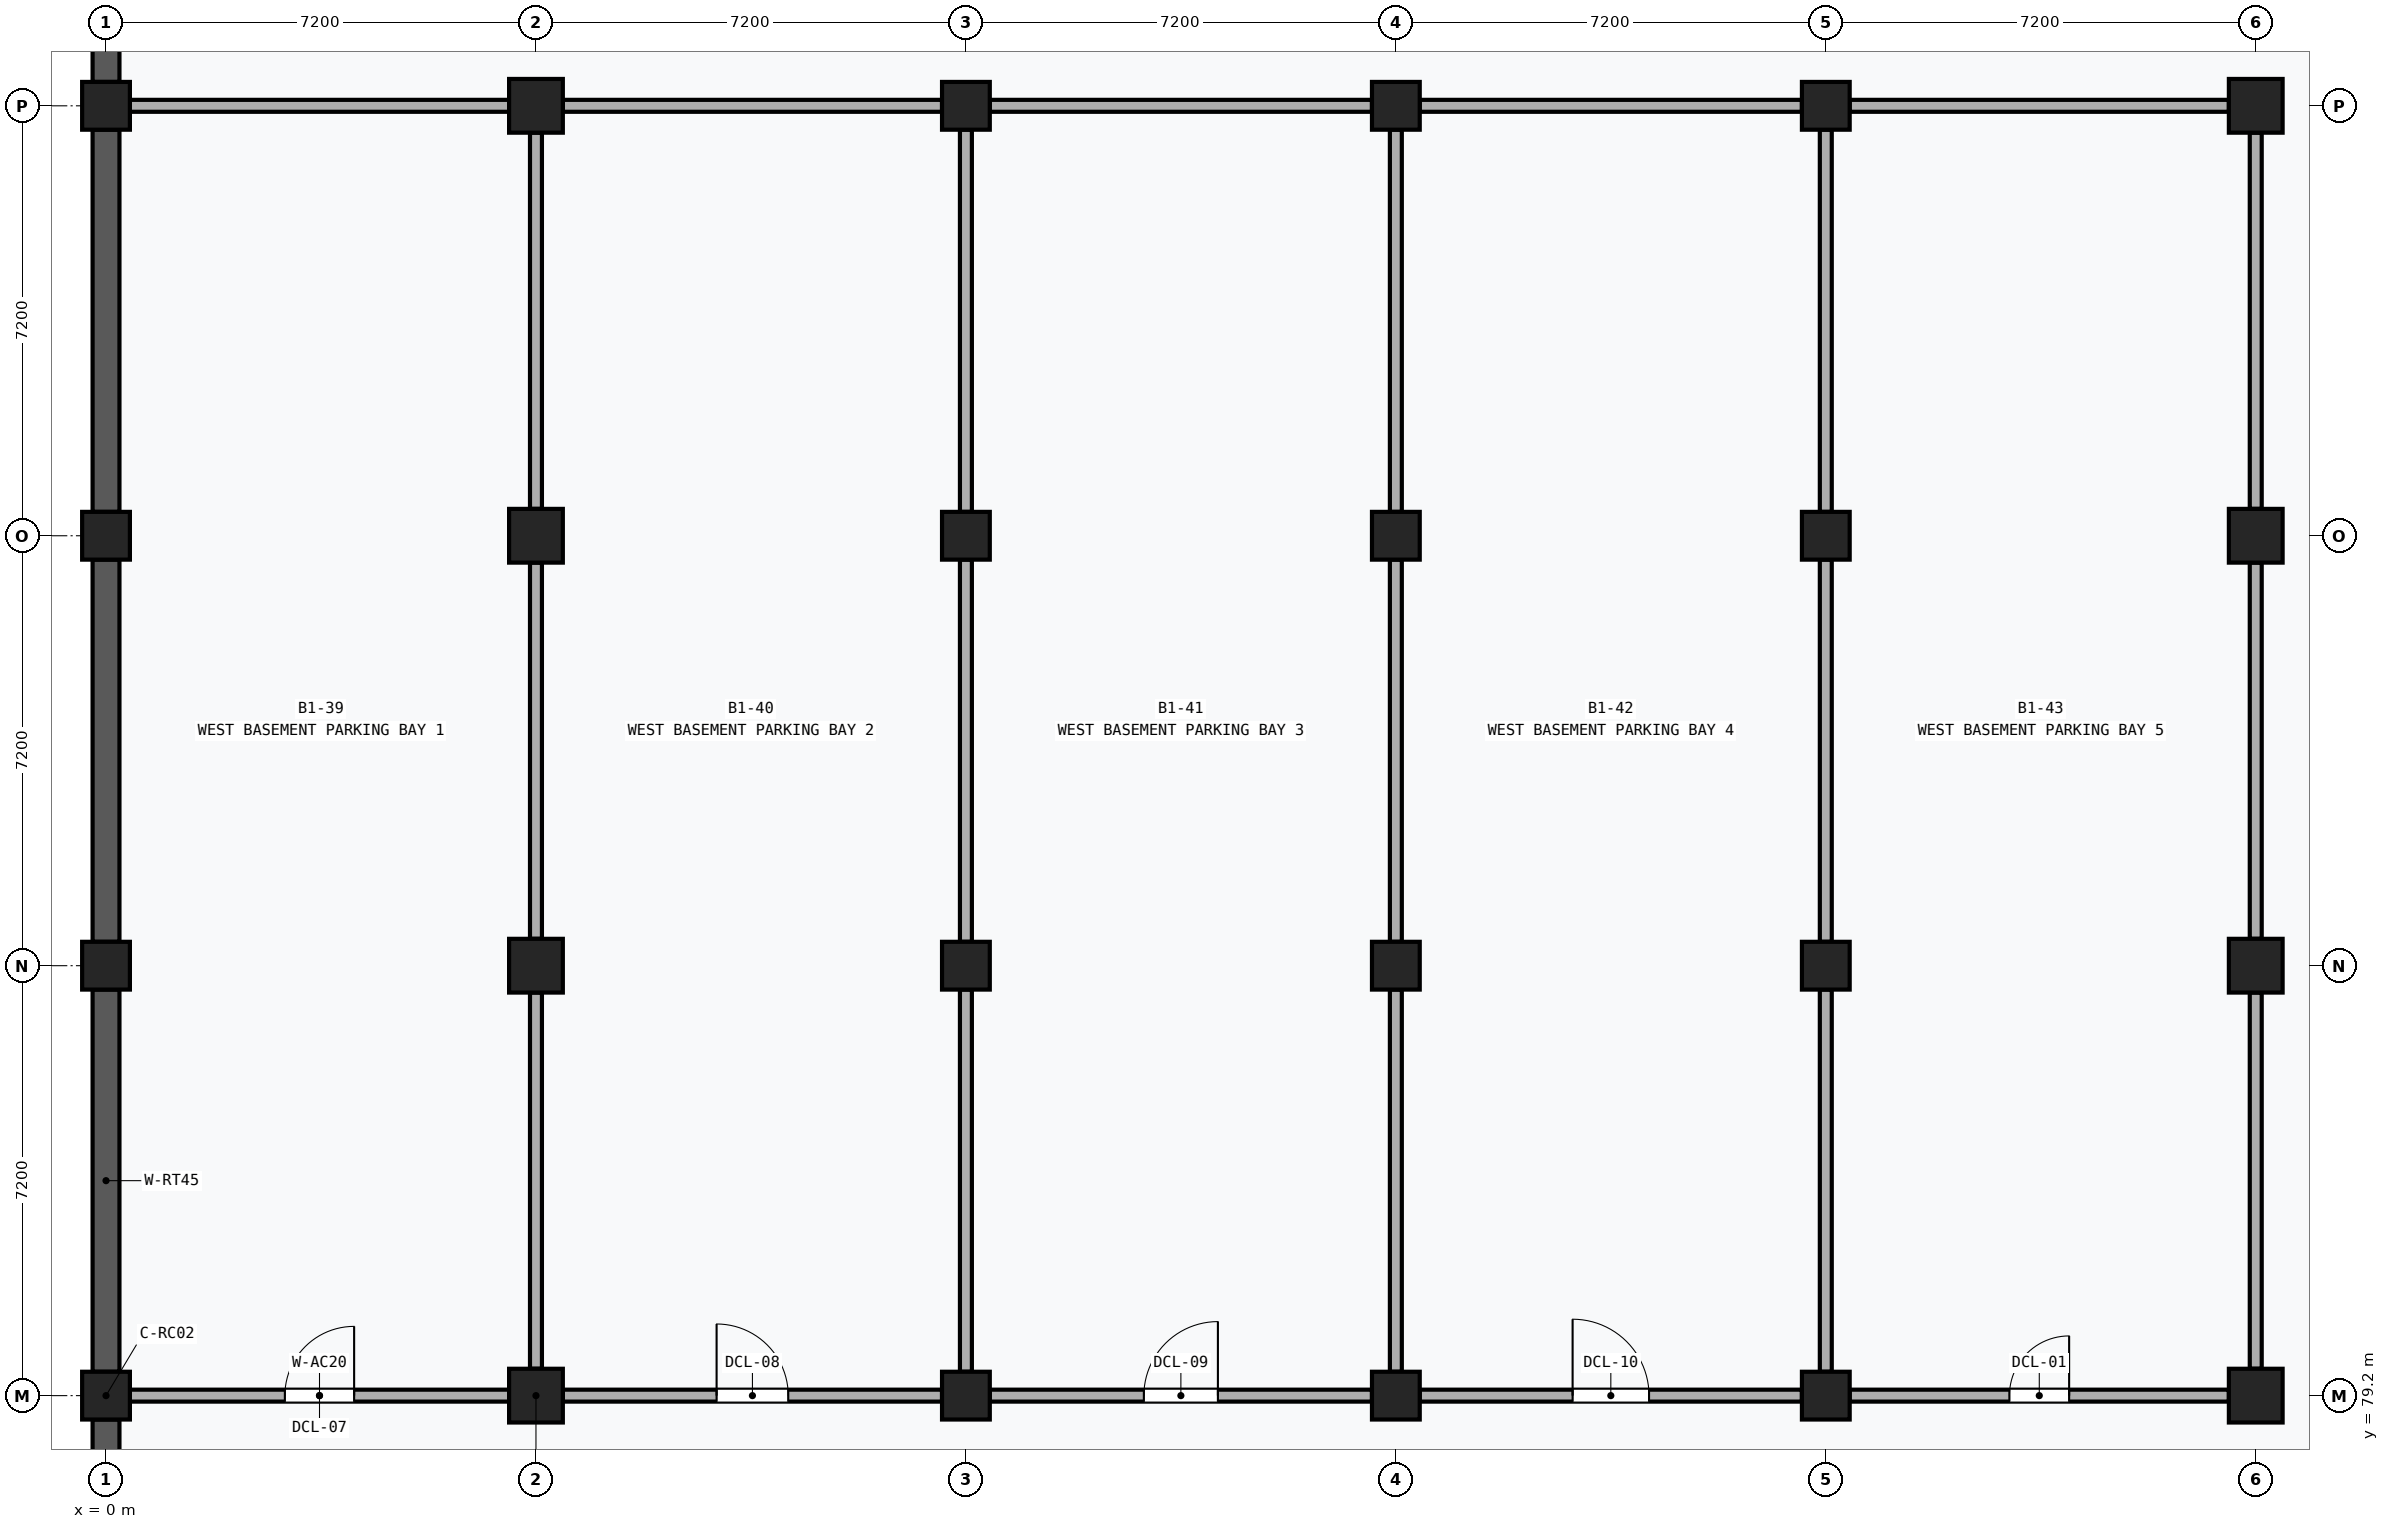
"""IFC4 building model, lengths in metres.
Left out: names, types, materials, properties, quantities, classifications, styles, units other than length and angle.
Written with IfcOpenShell. Run it as: python <this file> out.ifc"""

import sys

from ifc_helpers import new_model, si_unit, direction, frame, frame_2d, origin, origin_2d, place, context, subcontext, project, spatial, rectangle, extrude, element, fill, save


model = new_model("IFC4")
c1 = context("Model", 3, precision=1e-05, world=origin(), true_north=direction((0.0, 1.0)))
c2 = subcontext(c1, "Body", "Model", "MODEL_VIEW")
j1 = project(units=[si_unit("LENGTHUNIT", "METRE"), si_unit("PLANEANGLEUNIT", "RADIAN")], contexts=[c1])
p1 = place(None, origin())
s1 = spatial("IfcSite", under=j1, at=p1, CompositionType="ELEMENT")
p2 = place(p1, origin())
s2 = spatial("IfcBuilding", under=s1, at=p2, CompositionType="ELEMENT")
p3 = place(p2, frame((0.0, 0.0, -4.5)))
s3 = spatial("IfcBuildingStorey", under=s2, at=p3, CompositionType="ELEMENT", Elevation=-4.5)
for number, where, z_axis, x_axis in (
    (1, (0.0, 79.2, 0.0), (0.0, 0.0, 1.0), (1.0, 0.0, 0.0)),
    (2, (0.0, 86.4, 0.0), (0.0, 0.0, 1.0), (1.0, 0.0, 0.0)),
    (3, (0.0, 93.6, 0.0), (0.0, 0.0, 1.0), (1.0, 0.0, 0.0)),
    (4, (0.0, 100.8, 0.0), (0.0, 0.0, 1.0), (1.0, 0.0, 0.0)),
):
    element("IfcColumn", number, at=place(p3, frame(where, z_axis=z_axis, x_axis=x_axis)), inside=s3, PredefinedType="COLUMN", context=c2, shape_type="SweptSolid", body=[
        extrude(rectangle(XDim=0.8, YDim=0.8, at=origin_2d()), origin(), (0.0, 0.0, 1.0), 4.5),
    ])
for number, where, z_axis, x_axis in (
    (5, (7.2, 79.2, 0.0), (0.0, 0.0, 1.0), (1.0, 0.0, 0.0)),
    (6, (7.2, 86.4, 0.0), (0.0, 0.0, 1.0), (1.0, 0.0, 0.0)),
    (7, (7.2, 93.6, 0.0), (0.0, 0.0, 1.0), (1.0, 0.0, 0.0)),
    (8, (7.2, 100.8, 0.0), (0.0, 0.0, 1.0), (1.0, 0.0, 0.0)),
):
    element("IfcColumn", number, at=place(p3, frame(where, z_axis=z_axis, x_axis=x_axis)), inside=s3, PredefinedType="COLUMN", context=c2, shape_type="SweptSolid", body=[
        extrude(rectangle(XDim=0.9, YDim=0.9, at=origin_2d()), origin(), (0.0, 0.0, 1.0), 4.5),
    ])
for number, where, z_axis, x_axis in (
    (9, (14.4, 79.2, 0.0), (0.0, 0.0, 1.0), (1.0, 0.0, 0.0)),
    (10, (14.4, 86.4, 0.0), (0.0, 0.0, 1.0), (1.0, 0.0, 0.0)),
    (11, (14.4, 93.6, 0.0), (0.0, 0.0, 1.0), (1.0, 0.0, 0.0)),
    (12, (14.4, 100.8, 0.0), (0.0, 0.0, 1.0), (1.0, 0.0, 0.0)),
    (13, (21.6, 79.2, 0.0), (0.0, 0.0, 1.0), (1.0, 0.0, 0.0)),
    (14, (21.6, 86.4, 0.0), (0.0, 0.0, 1.0), (1.0, 0.0, 0.0)),
    (15, (21.6, 93.6, 0.0), (0.0, 0.0, 1.0), (1.0, 0.0, 0.0)),
    (16, (21.6, 100.8, 0.0), (0.0, 0.0, 1.0), (1.0, 0.0, 0.0)),
    (17, (28.8, 79.2, 0.0), (0.0, 0.0, 1.0), (1.0, 0.0, 0.0)),
    (18, (28.8, 86.4, 0.0), (0.0, 0.0, 1.0), (1.0, 0.0, 0.0)),
    (19, (28.8, 93.6, 0.0), (0.0, 0.0, 1.0), (1.0, 0.0, 0.0)),
    (20, (28.8, 100.8, 0.0), (0.0, 0.0, 1.0), (1.0, 0.0, 0.0)),
):
    element("IfcColumn", number, at=place(p3, frame(where, z_axis=z_axis, x_axis=x_axis)), inside=s3, PredefinedType="COLUMN", context=c2, shape_type="SweptSolid", body=[
        extrude(rectangle(XDim=0.8, YDim=0.8, at=origin_2d()), origin(), (0.0, 0.0, 1.0), 4.5),
    ])
for number, where, z_axis, x_axis in (
    (21, (36.0, 79.2, 0.0), (0.0, 0.0, 1.0), (1.0, 0.0, 0.0)),
    (22, (36.0, 86.4, 0.0), (0.0, 0.0, 1.0), (1.0, 0.0, 0.0)),
    (23, (36.0, 93.6, 0.0), (0.0, 0.0, 1.0), (1.0, 0.0, 0.0)),
    (24, (36.0, 100.8, 0.0), (0.0, 0.0, 1.0), (1.0, 0.0, 0.0)),
):
    element("IfcColumn", number, at=place(p3, frame(where, z_axis=z_axis, x_axis=x_axis)), inside=s3, PredefinedType="COLUMN", context=c2, shape_type="SweptSolid", body=[
        extrude(rectangle(XDim=0.9, YDim=0.9, at=origin_2d()), origin(), (0.0, 0.0, 1.0), 4.5),
    ])
p4 = place(p3, frame((0.0, 72.4, 0.0), z_axis=(0.0, 0.0, 1.0), x_axis=(0.0, 1.0, 0.0)))
e25 = element("IfcWall", 25, at=p4, inside=s3, PredefinedType="SOLIDWALL", context=c2, shape_type="SweptSolid", body=[
    extrude(rectangle(XDim=6.4, YDim=0.45, at=frame_2d((3.2, 0.0))), origin(), (0.0, 0.0, 1.0), 3.57),
])
for number, where, z_axis, x_axis in (
    (26, (0.0, 79.6, 0.0), (0.0, 0.0, 1.0), (0.0, 1.0, 0.0)),
    (27, (0.0, 86.8, 0.0), (0.0, 0.0, 1.0), (0.0, 1.0, 0.0)),
    (28, (0.0, 94.0, 0.0), (0.0, 0.0, 1.0), (0.0, 1.0, 0.0)),
):
    element("IfcWall", number, at=place(p3, frame(where, z_axis=z_axis, x_axis=x_axis)), inside=s3, PredefinedType="SOLIDWALL", context=c2, shape_type="SweptSolid", body=[
        extrude(rectangle(XDim=6.4, YDim=0.45, at=frame_2d((3.2, 0.0))), origin(), (0.0, 0.0, 1.0), 3.57),
    ])
p5 = place(p3, frame((0.0, 101.2, 0.0), z_axis=(0.0, 0.0, 1.0), x_axis=(0.0, 1.0, 0.0)))
e29 = element("IfcWall", 29, at=p5, inside=s3, PredefinedType="SOLIDWALL", context=c2, shape_type="SweptSolid", body=[
    extrude(rectangle(XDim=6.4, YDim=0.45, at=frame_2d((3.2, 0.0))), origin(), (0.0, 0.0, 1.0), 3.57),
])
p6 = place(p3, frame((0.4, 79.2, 0.0), z_axis=(0.0, 0.0, 1.0), x_axis=(1.0, 0.0, 0.0)))
e30 = element("IfcWall", 30, at=p6, inside=s3, PredefinedType="PARTITIONING", context=c2, shape_type="SweptSolid", body=[
    extrude(rectangle(XDim=6.35, YDim=0.2, at=frame_2d((3.175, 0.0))), origin(), (0.0, 0.0, 1.0), 3.3),
])
p7 = place(p6, frame((2.595, 0.0, 0.0)))
e31 = element("IfcOpeningElement", 31, at=p7, cuts=e30, PredefinedType="OPENING", context=c2, shape_type="SweptSolid", body=[
    extrude(rectangle(XDim=1.16, YDim=2.22, at=frame_2d((0.58, 1.11))), frame((0.0, 0.112, 0.0), z_axis=(0.0, -1.0, 0.0), x_axis=(1.0, 0.0, 0.0)), (0.0, 0.0, 1.0), 0.224),
])
p8 = place(p3, frame((7.2, 79.65, 0.0), z_axis=(0.0, 0.0, 1.0), x_axis=(0.0, 1.0, 0.0)))
e32 = element("IfcWall", 32, at=p8, inside=s3, PredefinedType="PARTITIONING", context=c2, shape_type="SweptSolid", body=[
    extrude(rectangle(XDim=6.3, YDim=0.2, at=frame_2d((3.15, 0.0))), origin(), (0.0, 0.0, 1.0), 3.3),
])
p9 = place(p3, frame((7.2, 86.85, 0.0), z_axis=(0.0, 0.0, 1.0), x_axis=(0.0, 1.0, 0.0)))
e33 = element("IfcWall", 33, at=p9, inside=s3, PredefinedType="PARTITIONING", context=c2, shape_type="SweptSolid", body=[
    extrude(rectangle(XDim=6.3, YDim=0.2, at=frame_2d((3.15, 0.0))), origin(), (0.0, 0.0, 1.0), 3.3),
])
p10 = place(p3, frame((0.4, 100.8, 0.0), z_axis=(0.0, 0.0, 1.0), x_axis=(1.0, 0.0, 0.0)))
e34 = element("IfcWall", 34, at=p10, inside=s3, PredefinedType="PARTITIONING", context=c2, shape_type="SweptSolid", body=[
    extrude(rectangle(XDim=6.35, YDim=0.2, at=frame_2d((3.175, 0.0))), origin(), (0.0, 0.0, 1.0), 3.3),
])
p11 = place(p3, frame((7.2, 94.05, 0.0), z_axis=(0.0, 0.0, 1.0), x_axis=(0.0, 1.0, 0.0)))
e35 = element("IfcWall", 35, at=p11, inside=s3, PredefinedType="PARTITIONING", context=c2, shape_type="SweptSolid", body=[
    extrude(rectangle(XDim=6.3, YDim=0.2, at=frame_2d((3.15, 0.0))), origin(), (0.0, 0.0, 1.0), 3.3),
])
p12 = place(p3, frame((7.65, 79.2, 0.0), z_axis=(0.0, 0.0, 1.0), x_axis=(1.0, 0.0, 0.0)))
e36 = element("IfcWall", 36, at=p12, inside=s3, PredefinedType="PARTITIONING", context=c2, shape_type="SweptSolid", body=[
    extrude(rectangle(XDim=6.35, YDim=0.2, at=frame_2d((3.175, 0.0))), origin(), (0.0, 0.0, 1.0), 3.3),
])
p13 = place(p12, frame((2.575, 0.0, 0.0)))
e37 = element("IfcOpeningElement", 37, at=p13, cuts=e36, PredefinedType="OPENING", context=c2, shape_type="SweptSolid", body=[
    extrude(rectangle(XDim=1.2, YDim=2.24, at=frame_2d((0.6, 1.12))), frame((0.0, 0.112, 0.0), z_axis=(0.0, -1.0, 0.0), x_axis=(1.0, 0.0, 0.0)), (0.0, 0.0, 1.0), 0.224),
])
for number, where, z_axis, x_axis in (
    (38, (14.4, 79.6, 0.0), (0.0, 0.0, 1.0), (0.0, 1.0, 0.0)),
    (39, (14.4, 86.8, 0.0), (0.0, 0.0, 1.0), (0.0, 1.0, 0.0)),
):
    element("IfcWall", number, at=place(p3, frame(where, z_axis=z_axis, x_axis=x_axis)), inside=s3, PredefinedType="PARTITIONING", context=c2, shape_type="SweptSolid", body=[
        extrude(rectangle(XDim=6.4, YDim=0.2, at=frame_2d((3.2, 0.0))), origin(), (0.0, 0.0, 1.0), 3.3),
    ])
p14 = place(p3, frame((7.65, 100.8, 0.0), z_axis=(0.0, 0.0, 1.0), x_axis=(1.0, 0.0, 0.0)))
e40 = element("IfcWall", 40, at=p14, inside=s3, PredefinedType="PARTITIONING", context=c2, shape_type="SweptSolid", body=[
    extrude(rectangle(XDim=6.35, YDim=0.2, at=frame_2d((3.175, 0.0))), origin(), (0.0, 0.0, 1.0), 3.3),
])
p15 = place(p3, frame((14.4, 94.0, 0.0), z_axis=(0.0, 0.0, 1.0), x_axis=(0.0, 1.0, 0.0)))
e41 = element("IfcWall", 41, at=p15, inside=s3, PredefinedType="PARTITIONING", context=c2, shape_type="SweptSolid", body=[
    extrude(rectangle(XDim=6.4, YDim=0.2, at=frame_2d((3.2, 0.0))), origin(), (0.0, 0.0, 1.0), 3.3),
])
p16 = place(p3, frame((14.8, 79.2, 0.0), z_axis=(0.0, 0.0, 1.0), x_axis=(1.0, 0.0, 0.0)))
e42 = element("IfcWall", 42, at=p16, inside=s3, PredefinedType="PARTITIONING", context=c2, shape_type="SweptSolid", body=[
    extrude(rectangle(XDim=6.4, YDim=0.2, at=frame_2d((3.2, 0.0))), origin(), (0.0, 0.0, 1.0), 3.3),
])
p17 = place(p16, frame((2.58, 0.0, 0.0)))
e43 = element("IfcOpeningElement", 43, at=p17, cuts=e42, PredefinedType="OPENING", context=c2, shape_type="SweptSolid", body=[
    extrude(rectangle(XDim=1.24, YDim=2.26, at=frame_2d((0.62, 1.13))), frame((0.0, 0.112, 0.0), z_axis=(0.0, -1.0, 0.0), x_axis=(1.0, 0.0, 0.0)), (0.0, 0.0, 1.0), 0.224),
])
for number, where, z_axis, x_axis in (
    (44, (21.6, 79.6, 0.0), (0.0, 0.0, 1.0), (0.0, 1.0, 0.0)),
    (45, (21.6, 86.8, 0.0), (0.0, 0.0, 1.0), (0.0, 1.0, 0.0)),
    (46, (14.8, 100.8, 0.0), (0.0, 0.0, 1.0), (1.0, 0.0, 0.0)),
    (47, (21.6, 94.0, 0.0), (0.0, 0.0, 1.0), (0.0, 1.0, 0.0)),
):
    element("IfcWall", number, at=place(p3, frame(where, z_axis=z_axis, x_axis=x_axis)), inside=s3, PredefinedType="PARTITIONING", context=c2, shape_type="SweptSolid", body=[
        extrude(rectangle(XDim=6.4, YDim=0.2, at=frame_2d((3.2, 0.0))), origin(), (0.0, 0.0, 1.0), 3.3),
    ])
p18 = place(p3, frame((22.0, 79.2, 0.0), z_axis=(0.0, 0.0, 1.0), x_axis=(1.0, 0.0, 0.0)))
e48 = element("IfcWall", 48, at=p18, inside=s3, PredefinedType="PARTITIONING", context=c2, shape_type="SweptSolid", body=[
    extrude(rectangle(XDim=6.4, YDim=0.2, at=frame_2d((3.2, 0.0))), origin(), (0.0, 0.0, 1.0), 3.3),
])
p19 = place(p18, frame((2.56, 0.0, 0.0)))
e49 = element("IfcOpeningElement", 49, at=p19, cuts=e48, PredefinedType="OPENING", context=c2, shape_type="SweptSolid", body=[
    extrude(rectangle(XDim=1.28, YDim=2.28, at=frame_2d((0.64, 1.14))), frame((0.0, 0.112, 0.0), z_axis=(0.0, -1.0, 0.0), x_axis=(1.0, 0.0, 0.0)), (0.0, 0.0, 1.0), 0.224),
])
for number, where, z_axis, x_axis in (
    (50, (28.8, 79.6, 0.0), (0.0, 0.0, 1.0), (0.0, 1.0, 0.0)),
    (51, (28.8, 86.8, 0.0), (0.0, 0.0, 1.0), (0.0, 1.0, 0.0)),
    (52, (22.0, 100.8, 0.0), (0.0, 0.0, 1.0), (1.0, 0.0, 0.0)),
    (53, (28.8, 94.0, 0.0), (0.0, 0.0, 1.0), (0.0, 1.0, 0.0)),
):
    element("IfcWall", number, at=place(p3, frame(where, z_axis=z_axis, x_axis=x_axis)), inside=s3, PredefinedType="PARTITIONING", context=c2, shape_type="SweptSolid", body=[
        extrude(rectangle(XDim=6.4, YDim=0.2, at=frame_2d((3.2, 0.0))), origin(), (0.0, 0.0, 1.0), 3.3),
    ])
p20 = place(p3, frame((29.2, 79.2, 0.0), z_axis=(0.0, 0.0, 1.0), x_axis=(1.0, 0.0, 0.0)))
e54 = element("IfcWall", 54, at=p20, inside=s3, PredefinedType="PARTITIONING", context=c2, shape_type="SweptSolid", body=[
    extrude(rectangle(XDim=6.35, YDim=0.2, at=frame_2d((3.175, 0.0))), origin(), (0.0, 0.0, 1.0), 3.3),
])
p21 = place(p20, frame((2.675, 0.0, 0.0)))
e55 = element("IfcOpeningElement", 55, at=p21, cuts=e54, PredefinedType="OPENING", context=c2, shape_type="SweptSolid", body=[
    extrude(rectangle(XDim=1.0, YDim=2.1, at=frame_2d((0.5, 1.05))), frame((0.0, 0.112, 0.0), z_axis=(0.0, -1.0, 0.0), x_axis=(1.0, 0.0, 0.0)), (0.0, 0.0, 1.0), 0.224),
])
p22 = place(p3, frame((36.0, 79.65, 0.0), z_axis=(0.0, 0.0, 1.0), x_axis=(0.0, 1.0, 0.0)))
e56 = element("IfcWall", 56, at=p22, inside=s3, PredefinedType="PARTITIONING", context=c2, shape_type="SweptSolid", body=[
    extrude(rectangle(XDim=6.3, YDim=0.2, at=frame_2d((3.15, 0.0))), origin(), (0.0, 0.0, 1.0), 3.3),
])
p23 = place(p3, frame((36.0, 86.85, 0.0), z_axis=(0.0, 0.0, 1.0), x_axis=(0.0, 1.0, 0.0)))
e57 = element("IfcWall", 57, at=p23, inside=s3, PredefinedType="PARTITIONING", context=c2, shape_type="SweptSolid", body=[
    extrude(rectangle(XDim=6.3, YDim=0.2, at=frame_2d((3.15, 0.0))), origin(), (0.0, 0.0, 1.0), 3.3),
])
p24 = place(p3, frame((29.2, 100.8, 0.0), z_axis=(0.0, 0.0, 1.0), x_axis=(1.0, 0.0, 0.0)))
e58 = element("IfcWall", 58, at=p24, inside=s3, PredefinedType="PARTITIONING", context=c2, shape_type="SweptSolid", body=[
    extrude(rectangle(XDim=6.35, YDim=0.2, at=frame_2d((3.175, 0.0))), origin(), (0.0, 0.0, 1.0), 3.3),
])
p25 = place(p3, frame((36.0, 94.05, 0.0), z_axis=(0.0, 0.0, 1.0), x_axis=(0.0, 1.0, 0.0)))
e59 = element("IfcWall", 59, at=p25, inside=s3, PredefinedType="PARTITIONING", context=c2, shape_type="SweptSolid", body=[
    extrude(rectangle(XDim=6.3, YDim=0.2, at=frame_2d((3.15, 0.0))), origin(), (0.0, 0.0, 1.0), 3.3),
])
p26 = place(p7, origin())
e60 = element("IfcDoor", 60, at=p26, inside=s3, OperationType="SINGLE_SWING_RIGHT", PredefinedType="DOOR", context=c2, shape_type="SweptSolid", body=[
    extrude(rectangle(XDim=1.16, YDim=2.22, at=frame_2d((0.58, 1.11))), frame((0.0, 0.025, 0.0), z_axis=(0.0, -1.0, 0.0), x_axis=(1.0, 0.0, 0.0)), (0.0, 0.0, 1.0), 0.05),
])
fill(e31, e60)
p27 = place(p13, origin())
e61 = element("IfcDoor", 61, at=p27, inside=s3, OperationType="SINGLE_SWING_LEFT", PredefinedType="DOOR", context=c2, shape_type="SweptSolid", body=[
    extrude(rectangle(XDim=1.2, YDim=2.24, at=frame_2d((0.6, 1.12))), frame((0.0, 0.025, 0.0), z_axis=(0.0, -1.0, 0.0), x_axis=(1.0, 0.0, 0.0)), (0.0, 0.0, 1.0), 0.05),
])
fill(e37, e61)
p28 = place(p17, origin())
e62 = element("IfcDoor", 62, at=p28, inside=s3, OperationType="SINGLE_SWING_RIGHT", PredefinedType="DOOR", context=c2, shape_type="SweptSolid", body=[
    extrude(rectangle(XDim=1.24, YDim=2.26, at=frame_2d((0.62, 1.13))), frame((0.0, 0.025, 0.0), z_axis=(0.0, -1.0, 0.0), x_axis=(1.0, 0.0, 0.0)), (0.0, 0.0, 1.0), 0.05),
])
fill(e43, e62)
p29 = place(p19, origin())
e63 = element("IfcDoor", 63, at=p29, inside=s3, OperationType="SINGLE_SWING_LEFT", PredefinedType="DOOR", context=c2, shape_type="SweptSolid", body=[
    extrude(rectangle(XDim=1.28, YDim=2.28, at=frame_2d((0.64, 1.14))), frame((0.0, 0.025, 0.0), z_axis=(0.0, -1.0, 0.0), x_axis=(1.0, 0.0, 0.0)), (0.0, 0.0, 1.0), 0.05),
])
fill(e49, e63)
p30 = place(p21, origin())
e64 = element("IfcDoor", 64, at=p30, inside=s3, OperationType="SINGLE_SWING_RIGHT", PredefinedType="DOOR", context=c2, shape_type="SweptSolid", body=[
    extrude(rectangle(XDim=1.0, YDim=2.1, at=frame_2d((0.5, 1.05))), frame((0.0, 0.025, 0.0), z_axis=(0.0, -1.0, 0.0), x_axis=(1.0, 0.0, 0.0)), (0.0, 0.0, 1.0), 0.05),
])
fill(e55, e64)
save(model, sys.argv[1])
